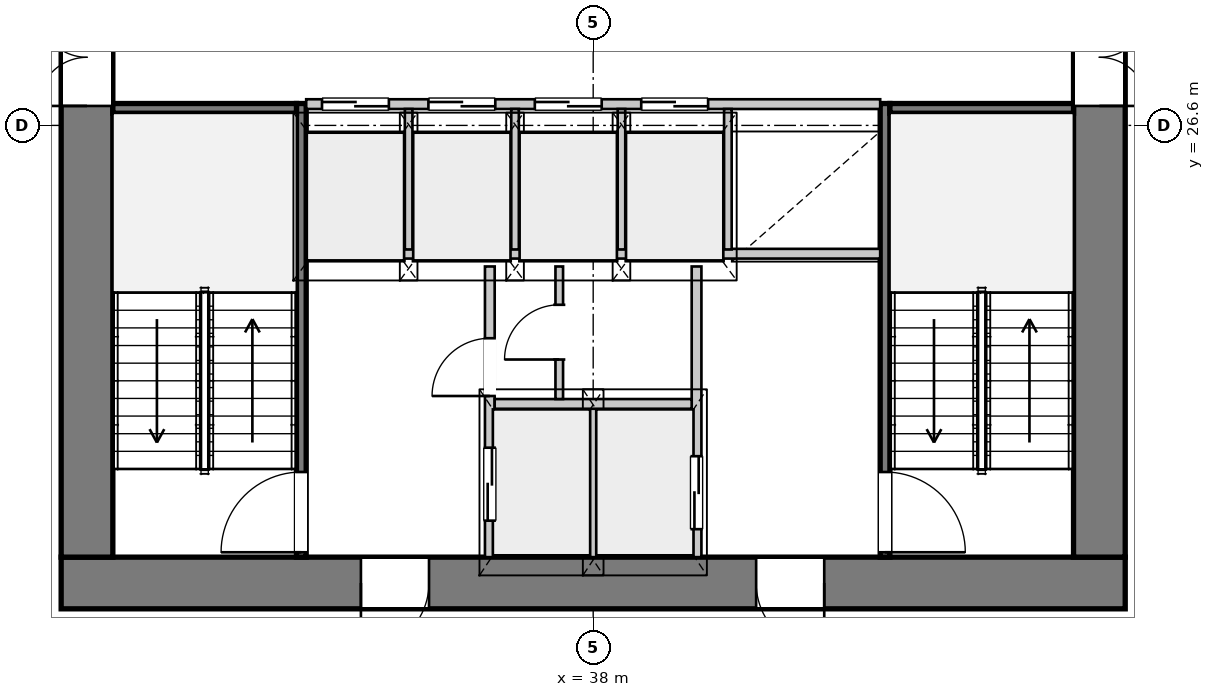
"""IFC4 building model, lengths in metres.
Left out: names, types, materials, properties, quantities, classifications, styles, units other than length and angle.
Written with IfcOpenShell. Run it as: python <this file> out.ifc"""

import sys

from ifc_helpers import new_model, si_unit, direction, frame, frame_2d, origin, place, context, subcontext, project, spatial, rectangle, extrude, source, transform, mapped, element, fill, save


model = new_model("IFC4")
c1 = context("Model", 3, precision=1e-05, world=origin(), true_north=direction((0.0, 1.0)))
c2 = subcontext(c1, "Body", "Model", "MODEL_VIEW")
j1 = project(units=[si_unit("LENGTHUNIT", "METRE"), si_unit("PLANEANGLEUNIT", "RADIAN")], contexts=[c1])
p1 = place(None, origin())
s1 = spatial("IfcSite", under=j1, at=p1, CompositionType="ELEMENT")
p2 = place(p1, origin())
s2 = spatial("IfcBuilding", under=s1, at=p2, CompositionType="ELEMENT")
p3 = place(p2, frame((0.0, 0.0, 36.4)))
s3 = spatial("IfcBuildingStorey", under=s2, at=p3, CompositionType="ELEMENT", Elevation=36.4)
p4 = place(p3, frame((46.75, 19.075, 0.0), z_axis=(0.0, 0.0, 1.0), x_axis=(-1.0, 0.0, 0.0)))
e1 = element("IfcWall", 1, at=p4, inside=s3, PredefinedType="SHEAR", context=c2, shape_type="SweptSolid", body=[
    extrude(rectangle(XDim=17.5, YDim=0.85, at=frame_2d((8.75, 0.0))), origin(), (0.0, 0.0, 1.0), 3.3),
])
p5 = place(p4, frame((4.95, 0.0, 0.0)))
e2 = element("IfcOpeningElement", 2, at=p5, cuts=e1, PredefinedType="OPENING", context=c2, shape_type="SweptSolid", body=[
    extrude(rectangle(XDim=1.12, YDim=2.25, at=frame_2d((0.56, 1.125))), frame((0.0, 0.435, 0.0), z_axis=(0.0, -1.0, 0.0), x_axis=(1.0, 0.0, 0.0)), (0.0, 0.0, 1.0), 0.87),
])
p6 = place(p4, frame((11.45, 0.0, 0.0)))
e3 = element("IfcOpeningElement", 3, at=p6, cuts=e1, PredefinedType="OPENING", context=c2, shape_type="SweptSolid", body=[
    extrude(rectangle(XDim=1.12, YDim=2.25, at=frame_2d((0.56, 1.125))), frame((0.0, 0.435, 0.0), z_axis=(0.0, -1.0, 0.0), x_axis=(1.0, 0.0, 0.0)), (0.0, 0.0, 1.0), 0.87),
])
p7 = place(p3, frame((29.675, 19.5, 0.0), z_axis=(0.0, 0.0, 1.0), x_axis=(0.0, 1.0, 0.0)))
e4 = element("IfcWall", 4, at=p7, inside=s3, PredefinedType="SHEAR", context=c2, shape_type="SweptSolid", body=[
    extrude(rectangle(XDim=14.2, YDim=0.85, at=frame_2d((7.1, 0.0))), origin(), (0.0, 0.0, 1.0), 3.3),
])
p8 = place(p7, frame((7.42, 0.0, 0.0)))
e5 = element("IfcOpeningElement", 5, at=p8, cuts=e4, PredefinedType="OPENING", context=c2, shape_type="SweptSolid", body=[
    extrude(rectangle(XDim=1.6, YDim=2.2, at=frame_2d((0.8, 1.1))), frame((0.0, 0.435, 0.0), z_axis=(0.0, -1.0, 0.0), x_axis=(1.0, 0.0, 0.0)), (0.0, 0.0, 1.0), 0.87),
])
p9 = place(p3, frame((46.325, 33.7, 0.0), z_axis=(0.0, 0.0, 1.0), x_axis=(0.0, -1.0, 0.0)))
e6 = element("IfcWall", 6, at=p9, inside=s3, PredefinedType="SHEAR", context=c2, shape_type="SweptSolid", body=[
    extrude(rectangle(XDim=14.2, YDim=0.85, at=frame_2d((7.1, 0.0))), origin(), (0.0, 0.0, 1.0), 3.3),
])
p10 = place(p9, frame((5.18, 0.0, 0.0)))
e7 = element("IfcOpeningElement", 7, at=p10, cuts=e6, PredefinedType="OPENING", context=c2, shape_type="SweptSolid", body=[
    extrude(rectangle(XDim=1.6, YDim=2.2, at=frame_2d((0.8, 1.1))), frame((0.0, 0.435, 0.0), z_axis=(0.0, -1.0, 0.0), x_axis=(1.0, 0.0, 0.0)), (0.0, 0.0, 1.0), 0.87),
])
p11 = place(p3, frame((33.2, 19.5, 0.0), z_axis=(0.0, 0.0, 1.0), x_axis=(0.0, 1.0, 0.0)))
e8 = element("IfcWall", 8, at=p11, inside=s3, PredefinedType="PARTITIONING", context=c2, shape_type="SweptSolid", body=[
    extrude(rectangle(XDim=7.46, YDim=0.16, at=frame_2d((3.73, 0.0))), origin(), (0.0, 0.0, 1.0), 3.3),
])
p12 = place(p11, frame((0.08, 0.0, 0.0)))
e9 = element("IfcOpeningElement", 9, at=p12, cuts=e8, PredefinedType="OPENING", context=c2, shape_type="SweptSolid", body=[
    extrude(rectangle(XDim=1.32, YDim=2.2, at=frame_2d((0.66, 1.1))), frame((0.0, 0.09, 0.0), z_axis=(0.0, -1.0, 0.0), x_axis=(1.0, 0.0, 0.0)), (0.0, 0.0, 1.0), 0.18),
])
p13 = place(p3, frame((30.1, 26.88, 0.0), z_axis=(0.0, 0.0, 1.0), x_axis=(1.0, 0.0, 0.0)))
e10 = element("IfcWall", 10, at=p13, inside=s3, PredefinedType="PARTITIONING", context=c2, shape_type="SweptSolid", body=[
    extrude(rectangle(XDim=3.02, YDim=0.16, at=frame_2d((1.51, 0.0))), origin(), (0.0, 0.0, 1.0), 3.3),
])
p14 = place(p3, frame((42.8, 26.96, 0.0), z_axis=(0.0, 0.0, 1.0), x_axis=(0.0, -1.0, 0.0)))
e11 = element("IfcWall", 11, at=p14, inside=s3, PredefinedType="PARTITIONING", context=c2, shape_type="SweptSolid", body=[
    extrude(rectangle(XDim=7.46, YDim=0.16, at=frame_2d((3.73, 0.0))), origin(), (0.0, 0.0, 1.0), 3.3),
])
p15 = place(p14, frame((6.06, 0.0, 0.0)))
e12 = element("IfcOpeningElement", 12, at=p15, cuts=e11, PredefinedType="OPENING", context=c2, shape_type="SweptSolid", body=[
    extrude(rectangle(XDim=1.32, YDim=2.2, at=frame_2d((0.66, 1.1))), frame((0.0, 0.09, 0.0), z_axis=(0.0, -1.0, 0.0), x_axis=(1.0, 0.0, 0.0)), (0.0, 0.0, 1.0), 0.18),
])
p16 = place(p3, frame((42.88, 26.88, 0.0), z_axis=(0.0, 0.0, 1.0), x_axis=(1.0, 0.0, 0.0)))
e13 = element("IfcWall", 13, at=p16, inside=s3, PredefinedType="PARTITIONING", context=c2, shape_type="SweptSolid", body=[
    extrude(rectangle(XDim=3.02, YDim=0.16, at=frame_2d((1.51, 0.0))), origin(), (0.0, 0.0, 1.0), 3.3),
])
p17 = place(p3, frame((36.3, 19.5, 0.0), z_axis=(0.0, 0.0, 1.0), x_axis=(0.0, 1.0, 0.0)))
e14 = element("IfcWall", 14, at=p17, inside=s3, PredefinedType="PARTITIONING", context=c2, shape_type="SweptSolid", body=[
    extrude(rectangle(XDim=4.78, YDim=0.16, at=frame_2d((2.39, 0.0))), origin(), (0.0, 0.0, 1.0), 3.3),
])
p18 = place(p17, frame((0.6, 0.0, 0.0)))
e15 = element("IfcOpeningElement", 15, at=p18, cuts=e14, PredefinedType="OPENING", context=c2, shape_type="SweptSolid", body=[
    extrude(rectangle(XDim=1.2, YDim=2.2, at=frame_2d((0.6, 1.1))), frame((0.0, 0.09, 0.0), z_axis=(0.0, -1.0, 0.0), x_axis=(1.0, 0.0, 0.0)), (0.0, 0.0, 1.0), 0.18),
])
p19 = place(p17, frame((2.65, 0.0, 0.0)))
e16 = element("IfcOpeningElement", 16, at=p19, cuts=e14, PredefinedType="OPENING", context=c2, shape_type="SweptSolid", body=[
    extrude(rectangle(XDim=0.95, YDim=2.1, at=frame_2d((0.475, 1.05))), frame((0.0, 0.09, 0.0), z_axis=(0.0, -1.0, 0.0), x_axis=(1.0, 0.0, 0.0)), (0.0, 0.0, 1.0), 0.18),
])
p20 = place(p3, frame((39.7, 24.28, 0.0), z_axis=(0.0, 0.0, 1.0), x_axis=(0.0, -1.0, 0.0)))
e17 = element("IfcWall", 17, at=p20, inside=s3, PredefinedType="PARTITIONING", context=c2, shape_type="SweptSolid", body=[
    extrude(rectangle(XDim=4.78, YDim=0.16, at=frame_2d((2.39, 0.0))), origin(), (0.0, 0.0, 1.0), 3.3),
])
p21 = place(p20, frame((3.12, 0.0, 0.0)))
e18 = element("IfcOpeningElement", 18, at=p21, cuts=e17, PredefinedType="OPENING", context=c2, shape_type="SweptSolid", body=[
    extrude(rectangle(XDim=1.2, YDim=2.2, at=frame_2d((0.6, 1.1))), frame((0.0, 0.09, 0.0), z_axis=(0.0, -1.0, 0.0), x_axis=(1.0, 0.0, 0.0)), (0.0, 0.0, 1.0), 0.18),
])
p22 = place(p3, frame((38.0, 19.5, 0.0), z_axis=(0.0, 0.0, 1.0), x_axis=(0.0, 1.0, 0.0)))
e19 = element("IfcWall", 19, at=p22, inside=s3, PredefinedType="PARTITIONING", context=c2, shape_type="SweptSolid", body=[
    extrude(rectangle(XDim=2.46, YDim=0.125, at=frame_2d((1.23, 0.0))), origin(), (0.0, 0.0, 1.0), 3.3),
])
p23 = place(p3, frame((36.38, 22.02, 0.0), z_axis=(0.0, 0.0, 1.0), x_axis=(1.0, 0.0, 0.0)))
e20 = element("IfcWall", 20, at=p23, inside=s3, PredefinedType="PARTITIONING", context=c2, shape_type="SweptSolid", body=[
    extrude(rectangle(XDim=3.24, YDim=0.16, at=frame_2d((1.62, 0.0))), origin(), (0.0, 0.0, 1.0), 3.3),
])
p24 = place(p3, frame((33.28, 24.49, 0.0), z_axis=(0.0, 0.0, 1.0), x_axis=(1.0, 0.0, 0.0)))
e21 = element("IfcWall", 21, at=p24, inside=s3, PredefinedType="PARTITIONING", context=c2, shape_type="SweptSolid", body=[
    extrude(rectangle(XDim=9.44, YDim=0.16, at=frame_2d((4.72, 0.0))), origin(), (0.0, 0.0, 1.0), 3.3),
])
p25 = place(p3, frame((37.442, 22.1, 0.0), z_axis=(0.0, 0.0, 1.0), x_axis=(0.0, 1.0, 0.0)))
e22 = element("IfcWall", 22, at=p25, inside=s3, PredefinedType="PARTITIONING", context=c2, shape_type="SweptSolid", body=[
    extrude(rectangle(XDim=2.18, YDim=0.125, at=frame_2d((1.09, 0.0))), origin(), (0.0, 0.0, 1.0), 3.3),
])
p26 = place(p25, frame((0.65, 0.0, 0.0)))
e23 = element("IfcOpeningElement", 23, at=p26, cuts=e22, PredefinedType="OPENING", context=c2, shape_type="SweptSolid", body=[
    extrude(rectangle(XDim=0.9, YDim=2.1, at=frame_2d((0.45, 1.05))), frame((0.0, 0.073, 0.0), z_axis=(0.0, -1.0, 0.0), x_axis=(1.0, 0.0, 0.0)), (0.0, 0.0, 1.0), 0.145),
])
p27 = place(p3, frame((33.28, 26.95, 0.0), z_axis=(0.0, 0.0, 1.0), x_axis=(1.0, 0.0, 0.0)))
e24 = element("IfcWall", 24, at=p27, inside=s3, PredefinedType="PARTITIONING", context=c2, shape_type="SweptSolid", body=[
    extrude(rectangle(XDim=9.44, YDim=0.16, at=frame_2d((4.72, 0.0))), origin(), (0.0, 0.0, 1.0), 3.3),
])
p28 = place(p27, frame((0.26, 0.0, 0.0)))
e25 = element("IfcOpeningElement", 25, at=p28, cuts=e24, PredefinedType="OPENING", context=c2, shape_type="SweptSolid", body=[
    extrude(rectangle(XDim=1.1, YDim=2.2, at=frame_2d((0.55, 1.1))), frame((0.0, 0.09, 0.0), z_axis=(0.0, -1.0, 0.0), x_axis=(1.0, 0.0, 0.0)), (0.0, 0.0, 1.0), 0.18),
])
p29 = place(p27, frame((2.01, 0.0, 0.0)))
e26 = element("IfcOpeningElement", 26, at=p29, cuts=e24, PredefinedType="OPENING", context=c2, shape_type="SweptSolid", body=[
    extrude(rectangle(XDim=1.1, YDim=2.2, at=frame_2d((0.55, 1.1))), frame((0.0, 0.09, 0.0), z_axis=(0.0, -1.0, 0.0), x_axis=(1.0, 0.0, 0.0)), (0.0, 0.0, 1.0), 0.18),
])
p30 = place(p27, frame((3.76, 0.0, 0.0)))
e27 = element("IfcOpeningElement", 27, at=p30, cuts=e24, PredefinedType="OPENING", context=c2, shape_type="SweptSolid", body=[
    extrude(rectangle(XDim=1.1, YDim=2.2, at=frame_2d((0.55, 1.1))), frame((0.0, 0.09, 0.0), z_axis=(0.0, -1.0, 0.0), x_axis=(1.0, 0.0, 0.0)), (0.0, 0.0, 1.0), 0.18),
])
p31 = place(p27, frame((5.51, 0.0, 0.0)))
e28 = element("IfcOpeningElement", 28, at=p31, cuts=e24, PredefinedType="OPENING", context=c2, shape_type="SweptSolid", body=[
    extrude(rectangle(XDim=1.1, YDim=2.2, at=frame_2d((0.55, 1.1))), frame((0.0, 0.09, 0.0), z_axis=(0.0, -1.0, 0.0), x_axis=(1.0, 0.0, 0.0)), (0.0, 0.0, 1.0), 0.18),
])
for number, where, z_axis, x_axis in (
    (29, (34.965, 24.56, 0.0), (0.0, 0.0, 1.0), (0.0, 1.0, 0.0)),
    (30, (36.715, 24.56, 0.0), (0.0, 0.0, 1.0), (0.0, 1.0, 0.0)),
    (31, (38.465, 24.56, 0.0), (0.0, 0.0, 1.0), (0.0, 1.0, 0.0)),
    (32, (40.215, 24.56, 0.0), (0.0, 0.0, 1.0), (0.0, 1.0, 0.0)),
):
    element("IfcWall", number, at=place(p3, frame(where, z_axis=z_axis, x_axis=x_axis)), inside=s3, PredefinedType="PARTITIONING", context=c2, shape_type="SweptSolid", body=[
        extrude(rectangle(XDim=2.31, YDim=0.125, at=frame_2d((1.155, 0.0))), origin(), (0.0, 0.0, 1.0), 3.3),
    ])
m1 = source(origin(), c2, "Body", "SweptSolid", [
    extrude(rectangle(XDim=1.12, YDim=2.25, at=frame_2d((0.56, 1.125))), frame((0.0, 0.025, 0.0), z_axis=(0.0, -1.0, 0.0), x_axis=(1.0, 0.0, 0.0)), (0.0, 0.0, 1.0), 0.05),
])
p32 = place(p5, origin())
e33 = element("IfcDoor", 33, at=p32, inside=s3, OperationType="SINGLE_SWING_LEFT", PredefinedType="DOOR", context=c2, shape_type="MappedRepresentation", body=[
    mapped(m1, transform((0.0, 0.0, 0.0), x_axis=(1.0, 0.0, 0.0), y_axis=(0.0, 1.0, 0.0), z_axis=(0.0, 0.0, 1.0), scale=1.0)),
])
fill(e2, e33)
p33 = place(p6, origin())
e34 = element("IfcDoor", 34, at=p33, inside=s3, OperationType="SINGLE_SWING_RIGHT", PredefinedType="DOOR", context=c2, shape_type="MappedRepresentation", body=[
    mapped(m1, transform((0.0, 0.0, 0.0), x_axis=(1.0, 0.0, 0.0), y_axis=(0.0, 1.0, 0.0), z_axis=(0.0, 0.0, 1.0), scale=1.0)),
])
fill(e3, e34)
m2 = source(origin(), c2, "Body", "SweptSolid", [
    extrude(rectangle(XDim=1.6, YDim=2.2, at=frame_2d((0.8, 1.1))), frame((0.0, 0.025, 0.0), z_axis=(0.0, -1.0, 0.0), x_axis=(1.0, 0.0, 0.0)), (0.0, 0.0, 1.0), 0.05),
])
p34 = place(p8, origin())
e35 = element("IfcDoor", 35, at=p34, inside=s3, OperationType="DOUBLE_DOOR_SINGLE_SWING", PredefinedType="DOOR", context=c2, shape_type="MappedRepresentation", body=[
    mapped(m2, transform((0.0, 0.0, 0.0), x_axis=(1.0, 0.0, 0.0), y_axis=(0.0, 1.0, 0.0), z_axis=(0.0, 0.0, 1.0), scale=1.0)),
])
fill(e5, e35)
p35 = place(p10, origin())
e36 = element("IfcDoor", 36, at=p35, inside=s3, OperationType="DOUBLE_DOOR_SINGLE_SWING", PredefinedType="DOOR", context=c2, shape_type="MappedRepresentation", body=[
    mapped(m2, transform((0.0, 0.0, 0.0), x_axis=(1.0, 0.0, 0.0), y_axis=(0.0, 1.0, 0.0), z_axis=(0.0, 0.0, 1.0), scale=1.0)),
])
fill(e7, e36)
m3 = source(origin(), c2, "Body", "SweptSolid", [
    extrude(rectangle(XDim=1.32, YDim=2.2, at=frame_2d((0.66, 1.1))), frame((0.0, 0.025, 0.0), z_axis=(0.0, -1.0, 0.0), x_axis=(1.0, 0.0, 0.0)), (0.0, 0.0, 1.0), 0.05),
])
p36 = place(p12, origin())
e37 = element("IfcDoor", 37, at=p36, inside=s3, OperationType="SINGLE_SWING_LEFT", PredefinedType="DOOR", context=c2, shape_type="MappedRepresentation", body=[
    mapped(m3, transform((0.0, 0.0, 0.0), x_axis=(1.0, 0.0, 0.0), y_axis=(0.0, 1.0, 0.0), z_axis=(0.0, 0.0, 1.0), scale=1.0)),
])
fill(e9, e37)
p37 = place(p15, origin())
e38 = element("IfcDoor", 38, at=p37, inside=s3, OperationType="SINGLE_SWING_RIGHT", PredefinedType="DOOR", context=c2, shape_type="MappedRepresentation", body=[
    mapped(m3, transform((0.0, 0.0, 0.0), x_axis=(1.0, 0.0, 0.0), y_axis=(0.0, 1.0, 0.0), z_axis=(0.0, 0.0, 1.0), scale=1.0)),
])
fill(e12, e38)
m4 = source(origin(), c2, "Body", "SweptSolid", [
    extrude(rectangle(XDim=1.2, YDim=2.2, at=frame_2d((0.6, 1.1))), frame((0.0, 0.025, 0.0), z_axis=(0.0, -1.0, 0.0), x_axis=(1.0, 0.0, 0.0)), (0.0, 0.0, 1.0), 0.05),
])
p38 = place(p18, origin())
e39 = element("IfcDoor", 39, at=p38, inside=s3, OperationType="DOUBLE_DOOR_SLIDING", PredefinedType="DOOR", context=c2, shape_type="MappedRepresentation", body=[
    mapped(m4, transform((0.0, 0.0, 0.0), x_axis=(1.0, 0.0, 0.0), y_axis=(0.0, 1.0, 0.0), z_axis=(0.0, 0.0, 1.0), scale=1.0)),
])
fill(e15, e39)
m5 = source(origin(), c2, "Body", "SweptSolid", [
    extrude(rectangle(XDim=0.95, YDim=2.1, at=frame_2d((0.475, 1.05))), frame((0.0, 0.025, 0.0), z_axis=(0.0, -1.0, 0.0), x_axis=(1.0, 0.0, 0.0)), (0.0, 0.0, 1.0), 0.05),
])
p39 = place(p19, origin())
e40 = element("IfcDoor", 40, at=p39, inside=s3, OperationType="SINGLE_SWING_LEFT", PredefinedType="DOOR", context=c2, shape_type="MappedRepresentation", body=[
    mapped(m5, transform((0.0, 0.0, 0.0), x_axis=(1.0, 0.0, 0.0), y_axis=(0.0, 1.0, 0.0), z_axis=(0.0, 0.0, 1.0), scale=1.0)),
])
fill(e16, e40)
m6 = source(origin(), c2, "Body", "SweptSolid", [
    extrude(rectangle(XDim=0.9, YDim=2.1, at=frame_2d((0.45, 1.05))), frame((0.0, 0.025, 0.0), z_axis=(0.0, -1.0, 0.0), x_axis=(1.0, 0.0, 0.0)), (0.0, 0.0, 1.0), 0.05),
])
p40 = place(p26, origin())
e41 = element("IfcDoor", 41, at=p40, inside=s3, OperationType="SINGLE_SWING_LEFT", PredefinedType="DOOR", context=c2, shape_type="MappedRepresentation", body=[
    mapped(m6, transform((0.0, 0.0, 0.0), x_axis=(1.0, 0.0, 0.0), y_axis=(0.0, 1.0, 0.0), z_axis=(0.0, 0.0, 1.0), scale=1.0)),
])
fill(e23, e41)
p41 = place(p21, origin())
e42 = element("IfcDoor", 42, at=p41, inside=s3, OperationType="DOUBLE_DOOR_SLIDING", PredefinedType="DOOR", context=c2, shape_type="MappedRepresentation", body=[
    mapped(m4, transform((0.0, 0.0, 0.0), x_axis=(1.0, 0.0, 0.0), y_axis=(0.0, 1.0, 0.0), z_axis=(0.0, 0.0, 1.0), scale=1.0)),
])
fill(e18, e42)
m7 = source(origin(), c2, "Body", "SweptSolid", [
    extrude(rectangle(XDim=1.1, YDim=2.2, at=frame_2d((0.55, 1.1))), frame((0.0, 0.025, 0.0), z_axis=(0.0, -1.0, 0.0), x_axis=(1.0, 0.0, 0.0)), (0.0, 0.0, 1.0), 0.05),
])
p42 = place(p28, origin())
e43 = element("IfcDoor", 43, at=p42, inside=s3, OperationType="DOUBLE_DOOR_SLIDING", PredefinedType="DOOR", context=c2, shape_type="MappedRepresentation", body=[
    mapped(m7, transform((0.0, 0.0, 0.0), x_axis=(1.0, 0.0, 0.0), y_axis=(0.0, 1.0, 0.0), z_axis=(0.0, 0.0, 1.0), scale=1.0)),
])
fill(e25, e43)
p43 = place(p29, origin())
e44 = element("IfcDoor", 44, at=p43, inside=s3, OperationType="DOUBLE_DOOR_SLIDING", PredefinedType="DOOR", context=c2, shape_type="MappedRepresentation", body=[
    mapped(m7, transform((0.0, 0.0, 0.0), x_axis=(1.0, 0.0, 0.0), y_axis=(0.0, 1.0, 0.0), z_axis=(0.0, 0.0, 1.0), scale=1.0)),
])
fill(e26, e44)
p44 = place(p30, origin())
e45 = element("IfcDoor", 45, at=p44, inside=s3, OperationType="DOUBLE_DOOR_SLIDING", PredefinedType="DOOR", context=c2, shape_type="MappedRepresentation", body=[
    mapped(m7, transform((0.0, 0.0, 0.0), x_axis=(1.0, 0.0, 0.0), y_axis=(0.0, 1.0, 0.0), z_axis=(0.0, 0.0, 1.0), scale=1.0)),
])
fill(e27, e45)
p45 = place(p31, origin())
e46 = element("IfcDoor", 46, at=p45, inside=s3, OperationType="DOUBLE_DOOR_SLIDING", PredefinedType="DOOR", context=c2, shape_type="MappedRepresentation", body=[
    mapped(m7, transform((0.0, 0.0, 0.0), x_axis=(1.0, 0.0, 0.0), y_axis=(0.0, 1.0, 0.0), z_axis=(0.0, 0.0, 1.0), scale=1.0)),
])
fill(e28, e46)
save(model, sys.argv[1])
